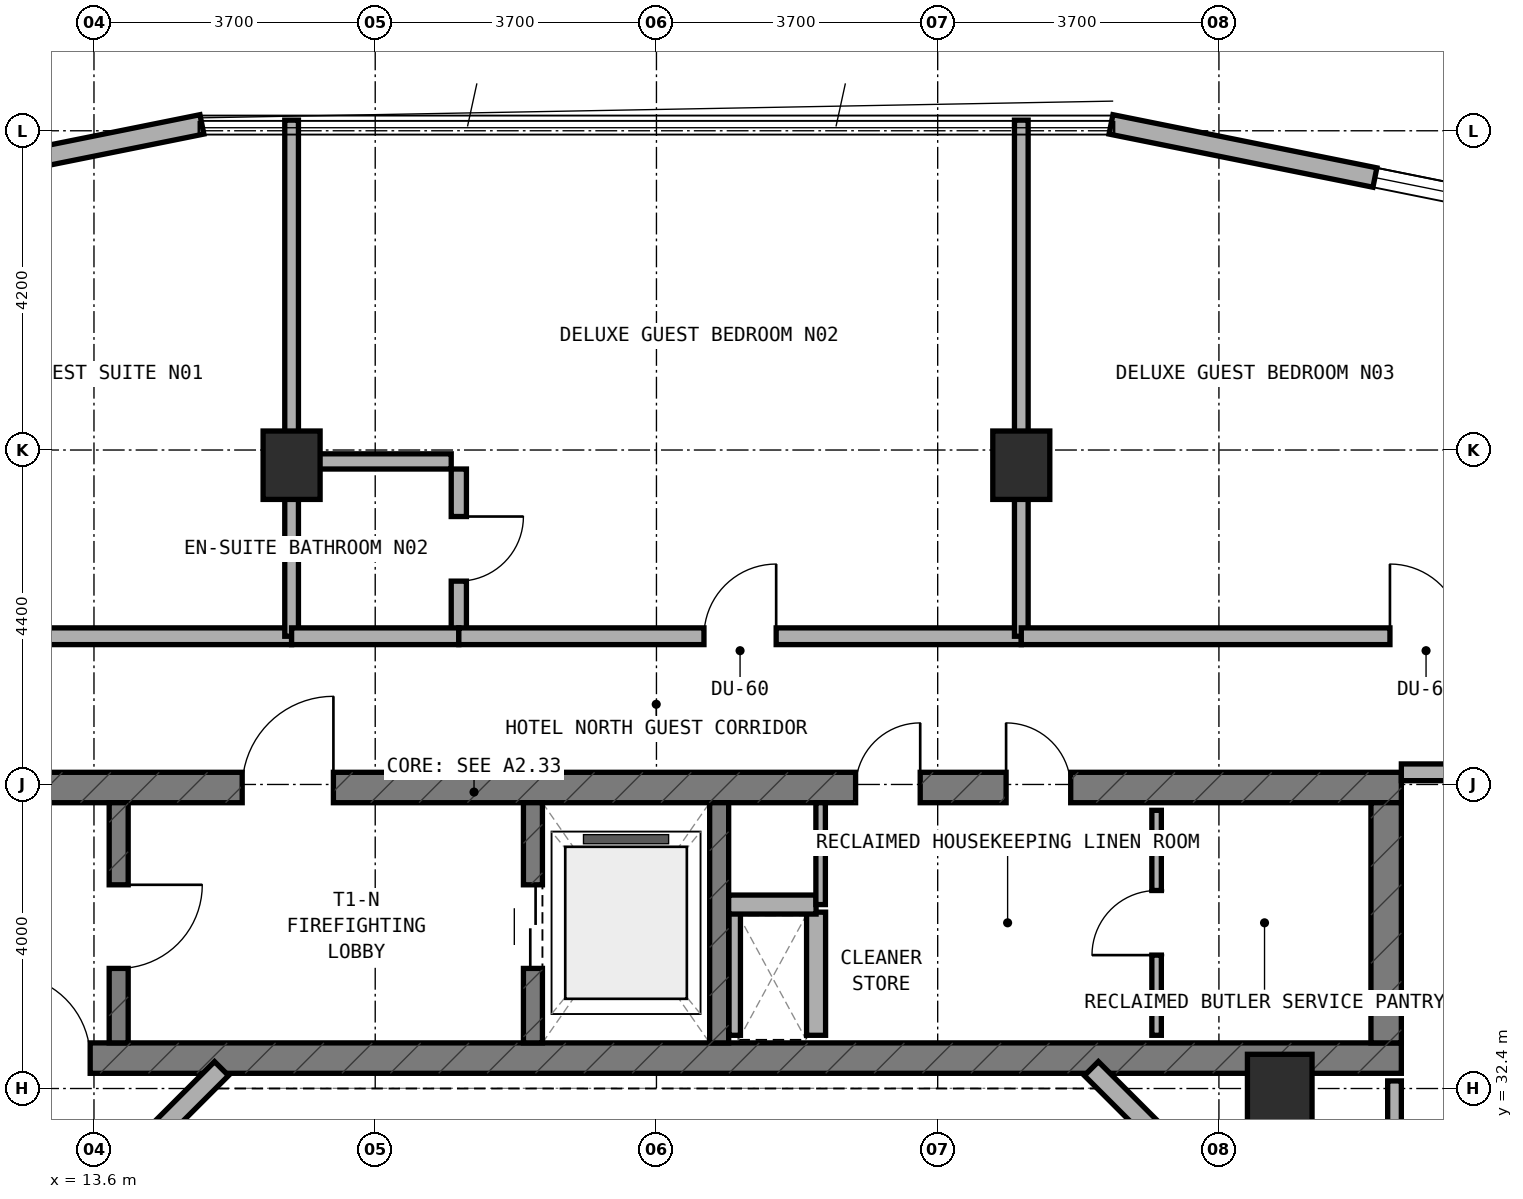
"""IFC4 building model, lengths in metres.
Left out: names, types, materials, properties, quantities, classifications, styles, units other than length and angle.
Written with IfcOpenShell. Run it as: python <this file> out.ifc"""

import sys

from ifc_helpers import new_model, si_unit, direction, frame, frame_2d, origin, origin_2d, place, context, subcontext, project, spatial, rectangle, extrude, element, fill, save


model = new_model("IFC4")
c1 = context("Model", 3, precision=1e-05, world=origin(), true_north=direction((0.0, 1.0)))
c2 = subcontext(c1, "Body", "Model", "MODEL_VIEW")
j1 = project(units=[si_unit("LENGTHUNIT", "METRE"), si_unit("PLANEANGLEUNIT", "RADIAN")], contexts=[c1])
p1 = place(None, origin())
s1 = spatial("IfcSite", under=j1, at=p1, CompositionType="ELEMENT")
p2 = place(p1, origin())
s2 = spatial("IfcBuilding", under=s1, at=p2, CompositionType="ELEMENT")
p3 = place(p2, frame((0.0, 0.0, 145.0)))
s3 = spatial("IfcBuildingStorey", under=s2, at=p3, CompositionType="ELEMENT", Elevation=145.0)
p4 = place(p3, frame((6.4, 32.8, 0.0), z_axis=(0.0, 0.0, 1.0), x_axis=(1.0, 0.0, 0.0)))
e1 = element("IfcWall", 1, at=p4, inside=s3, PredefinedType="SHEAR", context=c2, shape_type="SweptSolid", body=[
    extrude(rectangle(XDim=24.4, YDim=0.4, at=frame_2d((12.2, 0.0))), origin(), (0.0, 0.0, 1.0), 3.5),
])
p5 = place(p4, frame((6.05, 0.0, 0.0)))
e2 = element("IfcOpeningElement", 2, at=p5, cuts=e1, PredefinedType="OPENING", context=c2, shape_type="SweptSolid", body=[
    extrude(rectangle(XDim=1.1, YDim=2.15, at=frame_2d((0.55, 1.075))), frame((0.0, 0.21, 0.0), z_axis=(0.0, -1.0, 0.0), x_axis=(1.0, 0.0, 0.0)), (0.0, 0.0, 1.0), 0.42),
])
p6 = place(p3, frame((6.4, 36.36, 0.0), z_axis=(0.0, 0.0, 1.0), x_axis=(1.0, 0.0, 0.0)))
e3 = element("IfcWall", 3, at=p6, inside=s3, PredefinedType="SHEAR", context=c2, shape_type="SweptSolid", body=[
    extrude(rectangle(XDim=24.4, YDim=0.4, at=frame_2d((12.2, 0.0))), origin(), (0.0, 0.0, 1.0), 3.5),
])
p7 = place(p6, frame((9.15, 0.0, 0.0)))
e4 = element("IfcOpeningElement", 4, at=p7, cuts=e3, PredefinedType="OPENING", context=c2, shape_type="SweptSolid", body=[
    extrude(rectangle(XDim=1.2, YDim=2.15, at=frame_2d((0.6, 1.075))), frame((0.0, 0.21, 0.0), z_axis=(0.0, -1.0, 0.0), x_axis=(1.0, 0.0, 0.0)), (0.0, 0.0, 1.0), 0.42),
])
p8 = place(p6, frame((19.2, 0.0, 0.0)))
e5 = element("IfcOpeningElement", 5, at=p8, cuts=e3, PredefinedType="OPENING", context=c2, shape_type="SweptSolid", body=[
    extrude(rectangle(XDim=0.85, YDim=2.1, at=frame_2d((0.425, 1.05))), frame((0.0, 0.21, 0.0), z_axis=(0.0, -1.0, 0.0), x_axis=(1.0, 0.0, 0.0)), (0.0, 0.0, 1.0), 0.42),
])
p9 = place(p6, frame((17.22, 0.0, 0.0)))
e6 = element("IfcOpeningElement", 6, at=p9, cuts=e3, PredefinedType="OPENING", context=c2, shape_type="SweptSolid", body=[
    extrude(rectangle(XDim=0.85, YDim=2.1, at=frame_2d((0.425, 1.05))), frame((0.0, 0.21, 0.0), z_axis=(0.0, -1.0, 0.0), x_axis=(1.0, 0.0, 0.0)), (0.0, 0.0, 1.0), 0.42),
])
p10 = place(p3, frame((30.6, 33.0, 0.0), z_axis=(0.0, 0.0, 1.0), x_axis=(0.0, 1.0, 0.0)))
e7 = element("IfcWall", 7, at=p10, inside=s3, PredefinedType="SHEAR", context=c2, shape_type="SweptSolid", body=[
    extrude(rectangle(XDim=3.16, YDim=0.4, at=frame_2d((1.58, 0.0))), origin(), (0.0, 0.0, 1.0), 3.5),
])
p11 = place(p3, frame((13.925, 33.0, 0.0), z_axis=(0.0, 0.0, 1.0), x_axis=(0.0, 1.0, 0.0)))
e8 = element("IfcWall", 8, at=p11, inside=s3, PredefinedType="STANDARD", context=c2, shape_type="SweptSolid", body=[
    extrude(rectangle(XDim=3.16, YDim=0.25, at=frame_2d((1.58, 0.0))), origin(), (0.0, 0.0, 1.0), 3.22),
])
p12 = place(p11, frame((0.98, 0.0, 0.0)))
e9 = element("IfcOpeningElement", 9, at=p12, cuts=e8, PredefinedType="OPENING", context=c2, shape_type="SweptSolid", body=[
    extrude(rectangle(XDim=1.1, YDim=2.15, at=frame_2d((0.55, 1.075))), frame((0.0, 0.135, 0.0), z_axis=(0.0, -1.0, 0.0), x_axis=(1.0, 0.0, 0.0)), (0.0, 0.0, 1.0), 0.27),
])
p13 = place(p3, frame((19.375, 33.0, 0.0), z_axis=(0.0, 0.0, 1.0), x_axis=(0.0, 1.0, 0.0)))
e10 = element("IfcWall", 10, at=p13, inside=s3, PredefinedType="STANDARD", context=c2, shape_type="SweptSolid", body=[
    extrude(rectangle(XDim=3.16, YDim=0.25, at=frame_2d((1.58, 0.0))), origin(), (0.0, 0.0, 1.0), 3.22),
])
p14 = place(p13, frame((0.98, 0.0, 0.0)))
e11 = element("IfcOpeningElement", 11, at=p14, cuts=e10, PredefinedType="OPENING", context=c2, shape_type="SweptSolid", body=[
    extrude(rectangle(XDim=1.1, YDim=2.15, at=frame_2d((0.55, 1.075))), frame((0.0, 0.135, 0.0), z_axis=(0.0, -1.0, 0.0), x_axis=(1.0, 0.0, 0.0)), (0.0, 0.0, 1.0), 0.27),
])
p15 = place(p3, frame((21.825, 33.0, 0.0), z_axis=(0.0, 0.0, 1.0), x_axis=(0.0, 1.0, 0.0)))
e12 = element("IfcWall", 12, at=p15, inside=s3, PredefinedType="STANDARD", context=c2, shape_type="SweptSolid", body=[
    extrude(rectangle(XDim=3.16, YDim=0.25, at=frame_2d((1.58, 0.0))), origin(), (0.0, 0.0, 1.0), 3.22),
])
for number, where, z_axis, x_axis in (
    (13, (16.2, 40.6, 0.0), (0.0, 0.0, 1.0), (1.0, 0.0, 0.0)),
    (14, (25.8, 40.6, 0.0), (0.0, 0.0, 1.0), (1.0, 0.0, 0.0)),
):
    element("IfcColumn", number, at=place(p3, frame(where, z_axis=z_axis, x_axis=x_axis)), inside=s3, PredefinedType="COLUMN", context=c2, shape_type="SweptSolid", body=[
        extrude(rectangle(XDim=0.75, YDim=0.9, at=origin_2d()), origin(), (0.0, 0.0, 1.0), 3.5),
    ])
p16 = place(p3, frame((29.2, 32.35, 0.0), z_axis=(0.0, 0.0, 1.0), x_axis=(1.0, 0.0, 0.0)))
e15 = element("IfcColumn", 15, at=p16, inside=s3, PredefinedType="COLUMN", context=c2, shape_type="SweptSolid", body=[
    extrude(rectangle(XDim=0.85, YDim=1.0, at=origin_2d()), origin(), (0.0, 0.0, 1.0), 3.5),
])
p17 = place(p3, frame((35.982, 43.271, 0.0), z_axis=(0.0, 0.0, 1.0), x_axis=(-0.980315963543, 0.197435082048, 0.0)))
e16 = element("IfcWall", 16, at=p17, inside=s3, PredefinedType="STANDARD", context=c2, shape_type="SweptSolid", body=[
    extrude(rectangle(XDim=9.183, YDim=0.26, at=frame_2d((4.591, 0.0))), origin(), (0.0, 0.0, 1.0), 3.22),
])
p18 = place(p17, frame((3.541, 0.0, 0.85)))
e17 = element("IfcOpeningElement", 17, at=p18, cuts=e16, PredefinedType="OPENING", context=c2, shape_type="SweptSolid", body=[
    extrude(rectangle(XDim=2.1, YDim=1.5, at=frame_2d((1.05, 0.75))), frame((0.0, 0.14, 0.0), z_axis=(0.0, -1.0, 0.0), x_axis=(1.0, 0.0, 0.0)), (0.0, 0.0, 1.0), 0.28),
])
p19 = place(p3, frame((15.02, 45.084, 0.0), z_axis=(0.0, 0.0, 1.0), x_axis=(-0.980315963543, -0.197435082048, 0.0)))
e18 = element("IfcWall", 18, at=p19, inside=s3, PredefinedType="STANDARD", context=c2, shape_type="SweptSolid", body=[
    extrude(rectangle(XDim=9.183, YDim=0.26, at=frame_2d((4.591, 0.0))), origin(), (0.0, 0.0, 1.0), 3.22),
])
p20 = place(p19, frame((3.541, 0.0, 0.85)))
e19 = element("IfcOpeningElement", 19, at=p20, cuts=e18, PredefinedType="OPENING", context=c2, shape_type="SweptSolid", body=[
    extrude(rectangle(XDim=2.1, YDim=1.5, at=frame_2d((1.05, 0.75))), frame((0.0, 0.14, 0.0), z_axis=(0.0, -1.0, 0.0), x_axis=(1.0, 0.0, 0.0)), (0.0, 0.0, 1.0), 0.28),
])
for number, where, z_axis, x_axis in (
    (20, (28.556, 30.828, 0.0), (0.0, 0.0, 1.0), (-0.707, 0.707, 0.0)),
    (21, (15.278, 32.662, 0.0), (0.0, 0.0, 1.0), (-0.707, -0.707, 0.0)),
):
    element("IfcWall", number, at=place(p3, frame(where, z_axis=z_axis, x_axis=x_axis)), inside=s3, PredefinedType="STANDARD", context=c2, shape_type="SweptSolid", body=[
        extrude(rectangle(XDim=2.594, YDim=0.26, at=frame_2d((1.297, 0.0))), origin(), (0.0, 0.0, 1.0), 3.22),
    ])
p21 = place(p3, frame((27.58, 33.1, 0.0), z_axis=(0.0, 0.0, 1.0), x_axis=(0.0, 1.0, 0.0)))
e22 = element("IfcWall", 22, at=p21, inside=s3, PredefinedType="PARTITIONING", context=c2, shape_type="SweptSolid", body=[
    extrude(rectangle(XDim=2.96, YDim=0.125, at=frame_2d((1.48, 0.0))), origin(), (0.0, 0.0, 1.0), 2.795),
])
p22 = place(p21, frame((1.055, 0.0, 0.0)))
e23 = element("IfcOpeningElement", 23, at=p22, cuts=e22, PredefinedType="OPENING", context=c2, shape_type="SweptSolid", body=[
    extrude(rectangle(XDim=0.85, YDim=2.1, at=frame_2d((0.425, 1.05))), frame((0.0, 0.073, 0.0), z_axis=(0.0, -1.0, 0.0), x_axis=(1.0, 0.0, 0.0)), (0.0, 0.0, 1.0), 0.145),
])
p23 = place(p3, frame((22.03, 33.1, 0.0), z_axis=(0.0, 0.0, 1.0), x_axis=(0.0, 1.0, 0.0)))
e24 = element("IfcWall", 24, at=p23, inside=s3, PredefinedType="PARTITIONING", context=c2, shape_type="SweptSolid", body=[
    extrude(rectangle(XDim=1.62, YDim=0.15, at=frame_2d((0.81, 0.0))), origin(), (0.0, 0.0, 1.0), 3.22),
])
p24 = place(p3, frame((23.1, 33.1, 0.0), z_axis=(0.0, 0.0, 1.0), x_axis=(0.0, 1.0, 0.0)))
e25 = element("IfcWall", 25, at=p24, inside=s3, PredefinedType="SOLIDWALL", context=c2, shape_type="SweptSolid", body=[
    extrude(rectangle(XDim=1.62, YDim=0.25, at=frame_2d((0.81, 0.0))), origin(), (0.0, 0.0, 1.0), 3.22),
])
p25 = place(p3, frame((21.95, 34.82, 0.0), z_axis=(0.0, 0.0, 1.0), x_axis=(1.0, 0.0, 0.0)))
e26 = element("IfcWall", 26, at=p25, inside=s3, PredefinedType="SOLIDWALL", context=c2, shape_type="SweptSolid", body=[
    extrude(rectangle(XDim=1.15, YDim=0.25, at=frame_2d((0.575, 0.0))), origin(), (0.0, 0.0, 1.0), 3.22),
])
p26 = place(p3, frame((23.16, 34.82, 0.0), z_axis=(0.0, 0.0, 1.0), x_axis=(0.0, 1.0, 0.0)))
e27 = element("IfcWall", 27, at=p26, inside=s3, PredefinedType="PARTITIONING", context=c2, shape_type="SweptSolid", body=[
    extrude(rectangle(XDim=1.34, YDim=0.125, at=frame_2d((0.67, 0.0))), origin(), (0.0, 0.0, 1.0), 3.22),
])
p27 = place(p3, frame((5.55, 38.35, 0.0), z_axis=(0.0, 0.0, 1.0), x_axis=(1.0, 0.0, 0.0)))
e28 = element("IfcWall", 28, at=p27, inside=s3, PredefinedType="SOLIDWALL", context=c2, shape_type="SweptSolid", body=[
    extrude(rectangle(XDim=10.65, YDim=0.22, at=frame_2d((5.325, 0.0))), origin(), (0.0, 0.0, 1.0), 2.795),
])
p28 = place(p27, frame((4.85, 0.0, 0.0)))
e29 = element("IfcOpeningElement", 29, at=p28, cuts=e28, PredefinedType="OPENING", context=c2, shape_type="SweptSolid", body=[
    extrude(rectangle(XDim=0.95, YDim=2.1, at=frame_2d((0.475, 1.05))), frame((0.0, 0.12, 0.0), z_axis=(0.0, -1.0, 0.0), x_axis=(1.0, 0.0, 0.0)), (0.0, 0.0, 1.0), 0.24),
])
p29 = place(p3, frame((16.2, 38.35, 0.0), z_axis=(0.0, 0.0, 1.0), x_axis=(0.0, 1.0, 0.0)))
e30 = element("IfcWall", 30, at=p29, inside=s3, PredefinedType="SOLIDWALL", context=c2, shape_type="SweptSolid", body=[
    extrude(rectangle(XDim=6.79, YDim=0.18, at=frame_2d((3.395, 0.0))), origin(), (0.0, 0.0, 1.0), 2.795),
])
p30 = place(p3, frame((18.4, 38.45, 0.0), z_axis=(0.0, 0.0, 1.0), x_axis=(0.0, 1.0, 0.0)))
e31 = element("IfcWall", 31, at=p30, inside=s3, PredefinedType="PLUMBINGWALL", context=c2, shape_type="SweptSolid", body=[
    extrude(rectangle(XDim=2.1, YDim=0.2, at=frame_2d((1.05, 0.0))), origin(), (0.0, 0.0, 1.0), 2.835),
])
p31 = place(p30, frame((0.625, 0.0, 0.0)))
e32 = element("IfcOpeningElement", 32, at=p31, cuts=e31, PredefinedType="OPENING", context=c2, shape_type="SweptSolid", body=[
    extrude(rectangle(XDim=0.85, YDim=2.1, at=frame_2d((0.425, 1.05))), frame((0.0, 0.11, 0.0), z_axis=(0.0, -1.0, 0.0), x_axis=(1.0, 0.0, 0.0)), (0.0, 0.0, 1.0), 0.22),
])
p32 = place(p3, frame((16.3, 40.65, 0.0), z_axis=(0.0, 0.0, 1.0), x_axis=(1.0, 0.0, 0.0)))
e33 = element("IfcWall", 33, at=p32, inside=s3, PredefinedType="PLUMBINGWALL", context=c2, shape_type="SweptSolid", body=[
    extrude(rectangle(XDim=2.0, YDim=0.2, at=frame_2d((1.0, 0.0))), origin(), (0.0, 0.0, 1.0), 2.835),
])
p33 = place(p3, frame((16.2, 38.35, 0.0), z_axis=(0.0, 0.0, 1.0), x_axis=(1.0, 0.0, 0.0)))
e34 = element("IfcWall", 34, at=p33, inside=s3, PredefinedType="SOLIDWALL", context=c2, shape_type="SweptSolid", body=[
    extrude(rectangle(XDim=2.2, YDim=0.22, at=frame_2d((1.1, 0.0))), origin(), (0.0, 0.0, 1.0), 2.795),
])
p34 = place(p3, frame((18.4, 38.35, 0.0), z_axis=(0.0, 0.0, 1.0), x_axis=(1.0, 0.0, 0.0)))
e35 = element("IfcWall", 35, at=p34, inside=s3, PredefinedType="SOLIDWALL", context=c2, shape_type="SweptSolid", body=[
    extrude(rectangle(XDim=7.4, YDim=0.22, at=frame_2d((3.7, 0.0))), origin(), (0.0, 0.0, 1.0), 2.795),
])
p35 = place(p34, frame((3.225, 0.0, 0.0)))
e36 = element("IfcOpeningElement", 36, at=p35, cuts=e35, PredefinedType="OPENING", context=c2, shape_type="SweptSolid", body=[
    extrude(rectangle(XDim=0.95, YDim=2.1, at=frame_2d((0.475, 1.05))), frame((0.0, 0.12, 0.0), z_axis=(0.0, -1.0, 0.0), x_axis=(1.0, 0.0, 0.0)), (0.0, 0.0, 1.0), 0.24),
])
p36 = place(p3, frame((25.8, 38.35, 0.0), z_axis=(0.0, 0.0, 1.0), x_axis=(0.0, 1.0, 0.0)))
e37 = element("IfcWall", 37, at=p36, inside=s3, PredefinedType="SOLIDWALL", context=c2, shape_type="SweptSolid", body=[
    extrude(rectangle(XDim=6.79, YDim=0.18, at=frame_2d((3.395, 0.0))), origin(), (0.0, 0.0, 1.0), 2.795),
])
p37 = place(p3, frame((25.8, 38.35, 0.0), z_axis=(0.0, 0.0, 1.0), x_axis=(1.0, 0.0, 0.0)))
e38 = element("IfcWall", 38, at=p37, inside=s3, PredefinedType="SOLIDWALL", context=c2, shape_type="SweptSolid", body=[
    extrude(rectangle(XDim=10.65, YDim=0.22, at=frame_2d((5.325, 0.0))), origin(), (0.0, 0.0, 1.0), 2.795),
])
p38 = place(p37, frame((4.85, 0.0, 0.0)))
e39 = element("IfcOpeningElement", 39, at=p38, cuts=e38, PredefinedType="OPENING", context=c2, shape_type="SweptSolid", body=[
    extrude(rectangle(XDim=0.95, YDim=2.1, at=frame_2d((0.475, 1.05))), frame((0.0, 0.12, 0.0), z_axis=(0.0, -1.0, 0.0), x_axis=(1.0, 0.0, 0.0)), (0.0, 0.0, 1.0), 0.24),
])
p39 = place(p3, frame((30.71, 17.5, 0.0), z_axis=(0.0, 0.0, 1.0), x_axis=(0.0, 1.0, 0.0)))
e40 = element("IfcWall", 40, at=p39, inside=s3, PredefinedType="SOLIDWALL", context=c2, shape_type="SweptSolid", body=[
    extrude(rectangle(XDim=15.0, YDim=0.18, at=frame_2d((7.5, 0.0))), origin(), (0.0, 0.0, 1.0), 2.795),
])
p40 = place(p3, frame((30.8, 36.56, 0.0), z_axis=(0.0, 0.0, 1.0), x_axis=(1.0, 0.0, 0.0)))
e41 = element("IfcWall", 41, at=p40, inside=s3, PredefinedType="SOLIDWALL", context=c2, shape_type="SweptSolid", body=[
    extrude(rectangle(XDim=5.65, YDim=0.22, at=frame_2d((2.825, 0.0))), origin(), (0.0, 0.0, 1.0), 2.795),
])
p41 = place(p40, frame((2.35, 0.0, 0.0)))
e42 = element("IfcOpeningElement", 42, at=p41, cuts=e41, PredefinedType="OPENING", context=c2, shape_type="SweptSolid", body=[
    extrude(rectangle(XDim=0.95, YDim=2.1, at=frame_2d((0.475, 1.05))), frame((0.0, 0.12, 0.0), z_axis=(0.0, -1.0, 0.0), x_axis=(1.0, 0.0, 0.0)), (0.0, 0.0, 1.0), 0.24),
])
p42 = place(p18, origin())
e43 = element("IfcWindow", 43, at=p42, inside=s3, PartitioningType="SINGLE_PANEL", PredefinedType="WINDOW", context=c2, shape_type="SweptSolid", body=[
    extrude(rectangle(XDim=2.1, YDim=1.5, at=frame_2d((1.05, 0.75))), frame((0.0, 0.03, 0.0), z_axis=(0.0, -1.0, 0.0), x_axis=(1.0, 0.0, 0.0)), (0.0, 0.0, 1.0), 0.06),
])
fill(e17, e43)
p43 = place(p12, frame((1.1, 0.0, 0.0), z_axis=(0.0, 0.0, 1.0), x_axis=(-1.0, 0.0, 0.0)))
e44 = element("IfcDoor", 44, at=p43, inside=s3, OperationType="SINGLE_SWING_LEFT", PredefinedType="DOOR", context=c2, shape_type="SweptSolid", body=[
    extrude(rectangle(XDim=1.1, YDim=2.15, at=frame_2d((0.55, 1.075))), frame((0.0, 0.025, 0.0), z_axis=(0.0, -1.0, 0.0), x_axis=(1.0, 0.0, 0.0)), (0.0, 0.0, 1.0), 0.05),
])
fill(e9, e44)
p44 = place(p7, origin())
e45 = element("IfcDoor", 45, at=p44, inside=s3, OperationType="SINGLE_SWING_RIGHT", PredefinedType="DOOR", context=c2, shape_type="SweptSolid", body=[
    extrude(rectangle(XDim=1.2, YDim=2.15, at=frame_2d((0.6, 1.075))), frame((0.0, 0.025, 0.0), z_axis=(0.0, -1.0, 0.0), x_axis=(1.0, 0.0, 0.0)), (0.0, 0.0, 1.0), 0.05),
])
fill(e4, e45)
p45 = place(p14, origin())
e46 = element("IfcDoor", 46, at=p45, inside=s3, OperationType="DOUBLE_DOOR_SLIDING", PredefinedType="DOOR", context=c2, shape_type="SweptSolid", body=[
    extrude(rectangle(XDim=1.1, YDim=2.15, at=frame_2d((0.55, 1.075))), frame((0.0, 0.025, 0.0), z_axis=(0.0, -1.0, 0.0), x_axis=(1.0, 0.0, 0.0)), (0.0, 0.0, 1.0), 0.05),
])
fill(e11, e46)
p46 = place(p8, origin())
e47 = element("IfcDoor", 47, at=p46, inside=s3, OperationType="SINGLE_SWING_LEFT", PredefinedType="DOOR", context=c2, shape_type="SweptSolid", body=[
    extrude(rectangle(XDim=0.85, YDim=2.1, at=frame_2d((0.425, 1.05))), frame((0.0, 0.025, 0.0), z_axis=(0.0, -1.0, 0.0), x_axis=(1.0, 0.0, 0.0)), (0.0, 0.0, 1.0), 0.05),
])
fill(e5, e47)
p47 = place(p9, origin())
e48 = element("IfcDoor", 48, at=p47, inside=s3, OperationType="SINGLE_SWING_RIGHT", PredefinedType="DOOR", context=c2, shape_type="SweptSolid", body=[
    extrude(rectangle(XDim=0.85, YDim=2.1, at=frame_2d((0.425, 1.05))), frame((0.0, 0.025, 0.0), z_axis=(0.0, -1.0, 0.0), x_axis=(1.0, 0.0, 0.0)), (0.0, 0.0, 1.0), 0.05),
])
fill(e6, e48)
p48 = place(p5, origin())
e49 = element("IfcDoor", 49, at=p48, inside=s3, OperationType="SINGLE_SWING_LEFT", PredefinedType="DOOR", context=c2, shape_type="SweptSolid", body=[
    extrude(rectangle(XDim=1.1, YDim=2.15, at=frame_2d((0.55, 1.075))), frame((0.0, 0.025, 0.0), z_axis=(0.0, -1.0, 0.0), x_axis=(1.0, 0.0, 0.0)), (0.0, 0.0, 1.0), 0.05),
])
fill(e2, e49)
p49 = place(p22, origin())
e50 = element("IfcDoor", 50, at=p49, inside=s3, OperationType="SINGLE_SWING_LEFT", PredefinedType="DOOR", context=c2, shape_type="SweptSolid", body=[
    extrude(rectangle(XDim=0.85, YDim=2.1, at=frame_2d((0.425, 1.05))), frame((0.0, 0.025, 0.0), z_axis=(0.0, -1.0, 0.0), x_axis=(1.0, 0.0, 0.0)), (0.0, 0.0, 1.0), 0.05),
])
fill(e23, e50)
p50 = place(p31, frame((0.85, 0.0, 0.0), z_axis=(0.0, 0.0, 1.0), x_axis=(-1.0, 0.0, 0.0)))
e51 = element("IfcDoor", 51, at=p50, inside=s3, OperationType="SINGLE_SWING_LEFT", PredefinedType="DOOR", context=c2, shape_type="SweptSolid", body=[
    extrude(rectangle(XDim=0.85, YDim=2.1, at=frame_2d((0.425, 1.05))), frame((0.0, 0.025, 0.0), z_axis=(0.0, -1.0, 0.0), x_axis=(1.0, 0.0, 0.0)), (0.0, 0.0, 1.0), 0.05),
])
fill(e32, e51)
p51 = place(p35, origin())
e52 = element("IfcDoor", 52, at=p51, inside=s3, OperationType="SINGLE_SWING_RIGHT", PredefinedType="DOOR", context=c2, shape_type="SweptSolid", body=[
    extrude(rectangle(XDim=0.95, YDim=2.1, at=frame_2d((0.475, 1.05))), frame((0.0, 0.025, 0.0), z_axis=(0.0, -1.0, 0.0), x_axis=(1.0, 0.0, 0.0)), (0.0, 0.0, 1.0), 0.05),
])
fill(e36, e52)
p52 = place(p38, origin())
e53 = element("IfcDoor", 53, at=p52, inside=s3, OperationType="SINGLE_SWING_LEFT", PredefinedType="DOOR", context=c2, shape_type="SweptSolid", body=[
    extrude(rectangle(XDim=0.95, YDim=2.1, at=frame_2d((0.475, 1.05))), frame((0.0, 0.025, 0.0), z_axis=(0.0, -1.0, 0.0), x_axis=(1.0, 0.0, 0.0)), (0.0, 0.0, 1.0), 0.05),
])
fill(e39, e53)
save(model, sys.argv[1])
